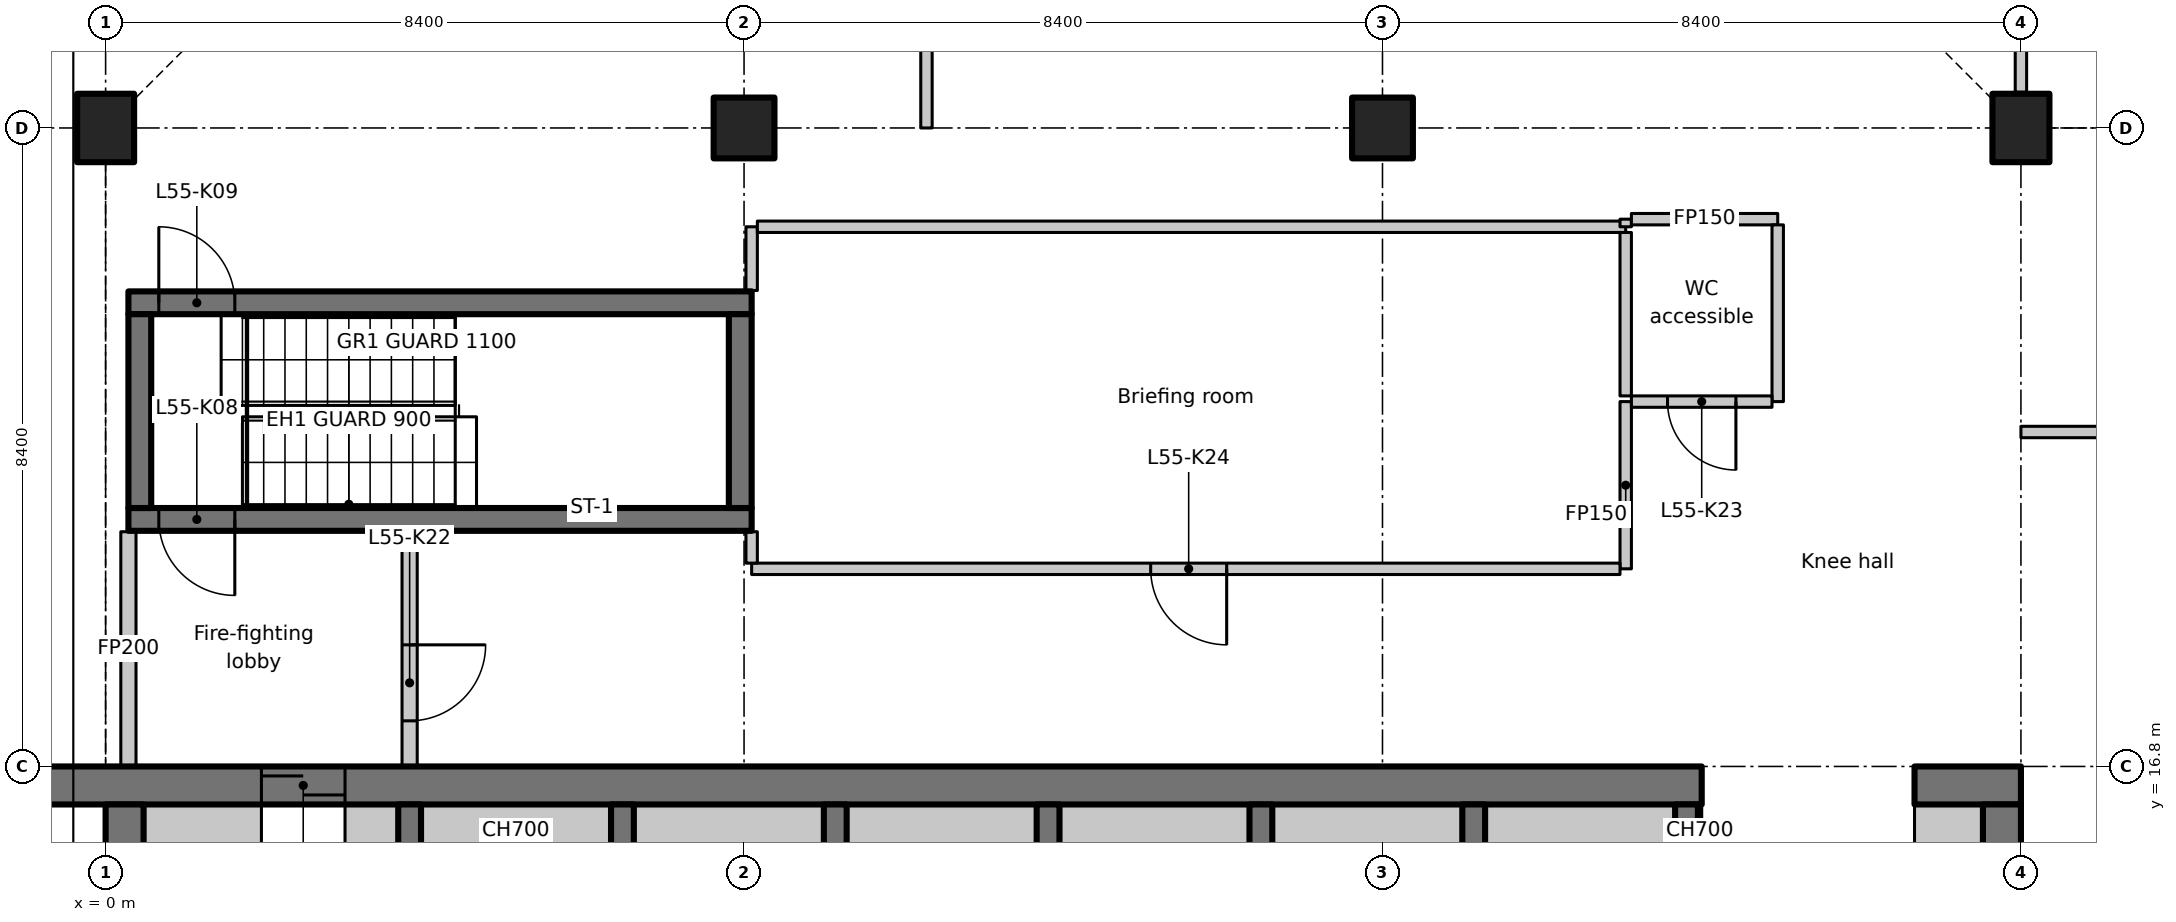
"""IFC4 building model, lengths in metres.
Left out: names, types, materials, properties, quantities, classifications, styles, units other than length and angle.
Written with IfcOpenShell. Run it as: python <this file> out.ifc"""

import sys

from ifc_helpers import new_model, si_unit, direction, frame, frame_2d, origin, origin_2d, place, context, subcontext, project, spatial, polyline, rectangle, outline, extrude, element, fill, save


model = new_model("IFC4")
c1 = context("Model", 3, precision=1e-05, world=origin(), true_north=direction((0.0, 1.0)))
c2 = subcontext(c1, "Body", "Model", "MODEL_VIEW")
j1 = project(units=[si_unit("LENGTHUNIT", "METRE"), si_unit("PLANEANGLEUNIT", "RADIAN")], contexts=[c1])
p1 = place(None, origin())
s1 = spatial("IfcSite", under=j1, at=p1, CompositionType="ELEMENT")
p2 = place(p1, origin())
s2 = spatial("IfcBuilding", under=s1, at=p2, CompositionType="ELEMENT")
p3 = place(p2, frame((0.0, 0.0, 219.3)))
s3 = spatial("IfcBuildingStorey", under=s2, at=p3, CompositionType="ELEMENT", Elevation=219.3)
p4 = place(p3, frame((0.0, 25.2, 0.0), z_axis=(0.0, 0.0, 1.0), x_axis=(1.0, 0.0, 0.0)))
e1 = element("IfcColumn", 1, at=p4, inside=s3, PredefinedType="COLUMN", context=c2, shape_type="SweptSolid", body=[
    extrude(rectangle(XDim=0.75, YDim=0.9, at=origin_2d()), origin(), (0.0, 0.0, 1.0), 3.35),
])
for number, where, z_axis, x_axis in (
    (2, (8.4, 25.2, 0.0), (0.0, 0.0, 1.0), (1.0, 0.0, 0.0)),
    (3, (16.8, 25.2, 0.0), (0.0, 0.0, 1.0), (1.0, 0.0, 0.0)),
):
    element("IfcColumn", number, at=place(p3, frame(where, z_axis=z_axis, x_axis=x_axis)), inside=s3, PredefinedType="COLUMN", context=c2, shape_type="SweptSolid", body=[
        extrude(rectangle(XDim=0.8, YDim=0.8, at=origin_2d()), origin(), (0.0, 0.0, 1.0), 3.35),
    ])
p5 = place(p3, frame((25.2, 25.2, 0.0), z_axis=(0.0, 0.0, 1.0), x_axis=(1.0, 0.0, 0.0)))
e4 = element("IfcColumn", 4, at=p5, inside=s3, PredefinedType="COLUMN", context=c2, shape_type="SweptSolid", body=[
    extrude(rectangle(XDim=0.75, YDim=0.9, at=origin_2d()), origin(), (0.0, 0.0, 1.0), 3.35),
])
p6 = place(p3, frame((-1.1, 16.55, 0.0), z_axis=(0.0, 0.0, 1.0), x_axis=(1.0, 0.0, 0.0)))
e5 = element("IfcWall", 5, at=p6, inside=s3, PredefinedType="SHEAR", context=c2, shape_type="SweptSolid", body=[
    extrude(rectangle(XDim=22.1, YDim=0.5, at=frame_2d((11.05, 0.0))), origin(), (0.0, 0.0, 1.0), 3.35),
])
p7 = place(p6, frame((3.15, 0.0, 0.0)))
e6 = element("IfcOpeningElement", 6, at=p7, cuts=e5, PredefinedType="OPENING", context=c2, shape_type="SweptSolid", body=[
    extrude(rectangle(XDim=1.1, YDim=2.3, at=frame_2d((0.55, 1.15))), frame((0.0, 0.26, 0.0), z_axis=(0.0, -1.0, 0.0), x_axis=(1.0, 0.0, 0.0)), (0.0, 0.0, 1.0), 0.52),
])
p8 = place(p3, frame((23.8, 16.55, 0.0), z_axis=(0.0, 0.0, 1.0), x_axis=(1.0, 0.0, 0.0)))
e7 = element("IfcWall", 7, at=p8, inside=s3, PredefinedType="SHEAR", context=c2, shape_type="SweptSolid", body=[
    extrude(rectangle(XDim=1.4, YDim=0.5, at=frame_2d((0.7, 0.0))), origin(), (0.0, 0.0, 1.0), 3.35),
])
p9 = place(p3, frame((0.25, 7.436, 0.0), z_axis=(0.0, 0.0, 1.0), x_axis=(0.0, 1.0, 0.0)))
e8 = element("IfcWall", 8, at=p9, inside=s3, PredefinedType="SHEAR", context=c2, shape_type="SweptSolid", body=[
    extrude(rectangle(XDim=8.864, YDim=0.5, at=frame_2d((4.432, 0.0))), origin(), (0.0, 0.0, 1.0), 3.35),
])
p10 = place(p3, frame((24.95, 12.6, 0.0), z_axis=(0.0, 0.0, 1.0), x_axis=(0.0, 1.0, 0.0)))
e9 = element("IfcWall", 9, at=p10, inside=s3, PredefinedType="SHEAR", context=c2, shape_type="SweptSolid", body=[
    extrude(rectangle(XDim=3.7, YDim=0.5, at=frame_2d((1.85, 0.0))), origin(), (0.0, 0.0, 1.0), 3.35),
])
p11 = place(p3, frame((0.5, 15.95, 0.0), z_axis=(0.0, 0.0, 1.0), x_axis=(1.0, 0.0, 0.0)))
e10 = element("IfcWall", 10, at=p11, inside=s3, PredefinedType="PARTITIONING", context=c2, shape_type="SweptSolid", body=[
    extrude(rectangle(XDim=1.55, YDim=0.7, at=frame_2d((0.775, 0.0))), origin(), (0.0, 0.0, 1.0), 3.35),
])
p12 = place(p3, frame((23.8, 15.95, 0.0), z_axis=(0.0, 0.0, 1.0), x_axis=(1.0, 0.0, 0.0)))
e11 = element("IfcWall", 11, at=p12, inside=s3, PredefinedType="PARTITIONING", context=c2, shape_type="SweptSolid", body=[
    extrude(rectangle(XDim=0.9, YDim=0.7, at=frame_2d((0.45, 0.0))), origin(), (0.0, 0.0, 1.0), 3.35),
])
for number, where, z_axis, x_axis in (
    (12, (4.0, 12.95, 0.0), (0.0, 0.0, 1.0), (0.0, 1.0, 0.0)),
    (13, (6.8, 12.95, 0.0), (0.0, 0.0, 1.0), (0.0, 1.0, 0.0)),
    (14, (9.6, 12.95, 0.0), (0.0, 0.0, 1.0), (0.0, 1.0, 0.0)),
    (15, (12.4, 12.95, 0.0), (0.0, 0.0, 1.0), (0.0, 1.0, 0.0)),
    (16, (15.2, 12.95, 0.0), (0.0, 0.0, 1.0), (0.0, 1.0, 0.0)),
    (17, (18.0, 12.95, 0.0), (0.0, 0.0, 1.0), (0.0, 1.0, 0.0)),
    (18, (20.8, 12.95, 0.0), (0.0, 0.0, 1.0), (0.0, 1.0, 0.0)),
):
    element("IfcWall", number, at=place(p3, frame(where, z_axis=z_axis, x_axis=x_axis)), inside=s3, PredefinedType="SHEAR", context=c2, shape_type="SweptSolid", body=[
        extrude(rectangle(XDim=3.35, YDim=0.3, at=frame_2d((1.675, 0.0))), origin(), (0.0, 0.0, 1.0), 3.35),
    ])
p13 = place(p3, frame((8.5, 20.05, 0.0), z_axis=(0.0, 0.0, 1.0), x_axis=(-1.0, 0.0, 0.0)))
e19 = element("IfcWall", 19, at=p13, inside=s3, PredefinedType="SHEAR", context=c2, shape_type="SweptSolid", body=[
    extrude(rectangle(XDim=8.2, YDim=0.3, at=frame_2d((4.1, 0.0))), origin(), (0.0, 0.0, 1.0), 3.35),
])
p14 = place(p13, frame((6.8, 0.0, 0.0)))
e20 = element("IfcOpeningElement", 20, at=p14, cuts=e19, PredefinedType="OPENING", context=c2, shape_type="SweptSolid", body=[
    extrude(rectangle(XDim=1.0, YDim=2.1, at=frame_2d((0.5, 1.05))), frame((0.0, 0.16, 0.0), z_axis=(0.0, -1.0, 0.0), x_axis=(1.0, 0.0, 0.0)), (0.0, 0.0, 1.0), 0.32),
])
p15 = place(p3, frame((0.3, 22.9, 0.0), z_axis=(0.0, 0.0, 1.0), x_axis=(1.0, 0.0, 0.0)))
e21 = element("IfcWall", 21, at=p15, inside=s3, PredefinedType="SHEAR", context=c2, shape_type="SweptSolid", body=[
    extrude(rectangle(XDim=8.2, YDim=0.3, at=frame_2d((4.1, 0.0))), origin(), (0.0, 0.0, 1.0), 3.35),
])
p16 = place(p15, frame((0.4, 0.0, 0.0)))
e22 = element("IfcOpeningElement", 22, at=p16, cuts=e21, PredefinedType="OPENING", context=c2, shape_type="SweptSolid", body=[
    extrude(rectangle(XDim=1.0, YDim=2.1, at=frame_2d((0.5, 1.05))), frame((0.0, 0.16, 0.0), z_axis=(0.0, -1.0, 0.0), x_axis=(1.0, 0.0, 0.0)), (0.0, 0.0, 1.0), 0.32),
])
for number, where, z_axis, x_axis in (
    (23, (0.45, 20.2, 0.0), (0.0, 0.0, 1.0), (0.0, 1.0, 0.0)),
    (24, (8.35, 20.2, 0.0), (0.0, 0.0, 1.0), (0.0, 1.0, 0.0)),
):
    element("IfcWall", number, at=place(p3, frame(where, z_axis=z_axis, x_axis=x_axis)), inside=s3, PredefinedType="SHEAR", context=c2, shape_type="SweptSolid", body=[
        extrude(rectangle(XDim=2.55, YDim=0.3, at=frame_2d((1.275, 0.0))), origin(), (0.0, 0.0, 1.0), 3.35),
    ])
p17 = place(p3, frame((0.3, 16.812, 0.0), z_axis=(0.0, 0.0, 1.0), x_axis=(0.0, 1.0, 0.0)))
e25 = element("IfcWall", 25, at=p17, inside=s3, PredefinedType="PARTITIONING", context=c2, shape_type="SweptSolid", body=[
    extrude(rectangle(XDim=3.076, YDim=0.2, at=frame_2d((1.538, 0.0))), origin(), (0.0, 0.0, 1.0), 2.98),
])
p18 = place(p3, frame((4.0, 19.888, 0.0), z_axis=(0.0, 0.0, 1.0), x_axis=(0.0, -1.0, 0.0)))
e26 = element("IfcWall", 26, at=p18, inside=s3, PredefinedType="PARTITIONING", context=c2, shape_type="SweptSolid", body=[
    extrude(rectangle(XDim=3.076, YDim=0.2, at=frame_2d((1.538, 0.0))), origin(), (0.0, 0.0, 1.0), 3.35),
])
p19 = place(p18, frame((1.488, 0.0, 0.0)))
e27 = element("IfcOpeningElement", 27, at=p19, cuts=e26, PredefinedType="OPENING", context=c2, shape_type="SweptSolid", body=[
    extrude(rectangle(XDim=1.0, YDim=2.1, at=frame_2d((0.5, 1.05))), frame((0.0, 0.11, 0.0), z_axis=(0.0, -1.0, 0.0), x_axis=(1.0, 0.0, 0.0)), (0.0, 0.0, 1.0), 0.22),
])
p20 = place(p3, frame((20.0, 21.6, 0.0), z_axis=(0.0, 0.0, 1.0), x_axis=(0.0, -1.0, 0.0)))
e28 = element("IfcWall", 28, at=p20, inside=s3, PredefinedType="PARTITIONING", context=c2, shape_type="SweptSolid", body=[
    extrude(rectangle(XDim=2.2, YDim=0.15, at=frame_2d((1.1, 0.0))), origin(), (0.0, 0.0, 1.0), 3.35),
])
p21 = place(p3, frame((19.925, 19.4, 0.0), z_axis=(0.0, 0.0, 1.0), x_axis=(-1.0, 0.0, 0.0)))
e29 = element("IfcWall", 29, at=p21, inside=s3, PredefinedType="PARTITIONING", context=c2, shape_type="SweptSolid", body=[
    extrude(rectangle(XDim=11.425, YDim=0.15, at=frame_2d((5.712, 0.0))), origin(), (0.0, 0.0, 1.0), 3.35),
])
p22 = place(p21, frame((5.175, 0.0, 0.0)))
e30 = element("IfcOpeningElement", 30, at=p22, cuts=e29, PredefinedType="OPENING", context=c2, shape_type="SweptSolid", body=[
    extrude(rectangle(XDim=1.0, YDim=2.1, at=frame_2d((0.5, 1.05))), frame((0.0, 0.085, 0.0), z_axis=(0.0, -1.0, 0.0), x_axis=(1.0, 0.0, 0.0)), (0.0, 0.0, 1.0), 0.17),
])
p23 = place(p3, frame((8.5, 19.475, 0.0), z_axis=(0.0, 0.0, 1.0), x_axis=(0.0, 1.0, 0.0)))
e31 = element("IfcWall", 31, at=p23, inside=s3, PredefinedType="PARTITIONING", context=c2, shape_type="SweptSolid", body=[
    extrude(rectangle(XDim=0.413, YDim=0.15, at=frame_2d((0.207, 0.0))), origin(), (0.0, 0.0, 1.0), 3.35),
])
p24 = place(p3, frame((8.5, 23.062, 0.0), z_axis=(0.0, 0.0, 1.0), x_axis=(0.0, 1.0, 0.0)))
e32 = element("IfcWall", 32, at=p24, inside=s3, PredefinedType="PARTITIONING", context=c2, shape_type="SweptSolid", body=[
    extrude(rectangle(XDim=0.838, YDim=0.15, at=frame_2d((0.419, 0.0))), origin(), (0.0, 0.0, 1.0), 3.35),
])
p25 = place(p3, frame((8.575, 23.9, 0.0), z_axis=(0.0, 0.0, 1.0), x_axis=(1.0, 0.0, 0.0)))
e33 = element("IfcWall", 33, at=p25, inside=s3, PredefinedType="PARTITIONING", context=c2, shape_type="SweptSolid", body=[
    extrude(rectangle(XDim=11.425, YDim=0.15, at=frame_2d((5.712, 0.0))), origin(), (0.0, 0.0, 1.0), 3.35),
])
p26 = place(p3, frame((20.0, 23.9, 0.0), z_axis=(0.0, 0.0, 1.0), x_axis=(0.0, 1.0, 0.0)))
e34 = element("IfcWall", 34, at=p26, inside=s3, PredefinedType="PARTITIONING", context=c2, shape_type="SweptSolid", body=[
    extrude(rectangle(XDim=0.1, YDim=0.15, at=frame_2d((0.05, 0.0))), origin(), (0.0, 0.0, 1.0), 3.35),
])
p27 = place(p3, frame((20.075, 24.0, 0.0), z_axis=(0.0, 0.0, 1.0), x_axis=(1.0, 0.0, 0.0)))
e35 = element("IfcWall", 35, at=p27, inside=s3, PredefinedType="PARTITIONING", context=c2, shape_type="SweptSolid", body=[
    extrude(rectangle(XDim=1.925, YDim=0.15, at=frame_2d((0.962, 0.0))), origin(), (0.0, 0.0, 1.0), 3.35),
])
p28 = place(p3, frame((22.0, 23.925, 0.0), z_axis=(0.0, 0.0, 1.0), x_axis=(0.0, -1.0, 0.0)))
e36 = element("IfcWall", 36, at=p28, inside=s3, PredefinedType="PARTITIONING", context=c2, shape_type="SweptSolid", body=[
    extrude(rectangle(XDim=2.325, YDim=0.15, at=frame_2d((1.163, 0.0))), origin(), (0.0, 0.0, 1.0), 3.35),
])
p29 = place(p3, frame((21.925, 21.6, 0.0), z_axis=(0.0, 0.0, 1.0), x_axis=(-1.0, 0.0, 0.0)))
e37 = element("IfcWall", 37, at=p29, inside=s3, PredefinedType="PARTITIONING", context=c2, shape_type="SweptSolid", body=[
    extrude(rectangle(XDim=1.85, YDim=0.15, at=frame_2d((0.925, 0.0))), origin(), (0.0, 0.0, 1.0), 3.35),
])
p30 = place(p29, frame((0.475, 0.0, 0.0)))
e38 = element("IfcOpeningElement", 38, at=p30, cuts=e37, PredefinedType="OPENING", context=c2, shape_type="SweptSolid", body=[
    extrude(rectangle(XDim=0.9, YDim=2.1, at=frame_2d((0.45, 1.05))), frame((0.0, 0.085, 0.0), z_axis=(0.0, -1.0, 0.0), x_axis=(1.0, 0.0, 0.0)), (0.0, 0.0, 1.0), 0.17),
])
p31 = place(p3, frame((20.0, 21.675, 0.0), z_axis=(0.0, 0.0, 1.0), x_axis=(0.0, 1.0, 0.0)))
e39 = element("IfcWall", 39, at=p31, inside=s3, PredefinedType="PARTITIONING", context=c2, shape_type="SweptSolid", body=[
    extrude(rectangle(XDim=2.15, YDim=0.15, at=frame_2d((1.075, 0.0))), origin(), (0.0, 0.0, 1.0), 3.35),
])
p32 = place(p3, frame((3.15, 15.95, 0.0), z_axis=(0.0, 0.0, 1.0), x_axis=(1.0, 0.0, 0.0)))
e40 = element("IfcWall", 40, at=p32, inside=s3, PredefinedType="PARTITIONING", context=c2, shape_type="SweptSolid", body=[
    extrude(rectangle(XDim=0.7, YDim=0.7, at=frame_2d((0.35, 0.0))), origin(), (0.0, 0.0, 1.0), 3.35),
])
for number, where, z_axis, x_axis in (
    (41, (4.15, 15.95, 0.0), (0.0, 0.0, 1.0), (1.0, 0.0, 0.0)),
    (42, (6.95, 15.95, 0.0), (0.0, 0.0, 1.0), (1.0, 0.0, 0.0)),
    (43, (9.75, 15.95, 0.0), (0.0, 0.0, 1.0), (1.0, 0.0, 0.0)),
    (44, (12.55, 15.95, 0.0), (0.0, 0.0, 1.0), (1.0, 0.0, 0.0)),
    (45, (15.35, 15.95, 0.0), (0.0, 0.0, 1.0), (1.0, 0.0, 0.0)),
    (46, (18.15, 15.95, 0.0), (0.0, 0.0, 1.0), (1.0, 0.0, 0.0)),
):
    element("IfcWall", number, at=place(p3, frame(where, z_axis=z_axis, x_axis=x_axis)), inside=s3, PredefinedType="PARTITIONING", context=c2, shape_type="SweptSolid", body=[
        extrude(rectangle(XDim=2.5, YDim=0.7, at=frame_2d((1.25, 0.0))), origin(), (0.0, 0.0, 1.0), 3.35),
    ])
p33 = place(p3, frame((20.95, 15.95, 0.0), z_axis=(0.0, 0.0, 1.0), x_axis=(1.0, 0.0, 0.0)))
e47 = element("IfcWall", 47, at=p33, inside=s3, PredefinedType="PARTITIONING", context=c2, shape_type="SweptSolid", body=[
    extrude(rectangle(XDim=0.05, YDim=0.7, at=frame_2d((0.025, 0.0))), origin(), (0.0, 0.0, 1.0), 3.35),
])
p34 = place(p3, frame((25.2, 21.2, 0.0), z_axis=(0.0, 0.0, 1.0), x_axis=(1.0, 0.0, 0.0)))
e48 = element("IfcWall", 48, at=p34, inside=s3, PredefinedType="PARTITIONING", context=c2, shape_type="SweptSolid", body=[
    extrude(rectangle(XDim=4.2, YDim=0.15, at=frame_2d((2.1, 0.0))), origin(), (0.0, 0.0, 1.0), 3.33),
])
p35 = place(p34, frame((1.5, 0.0, 0.0)))
e49 = element("IfcOpeningElement", 49, at=p35, cuts=e48, PredefinedType="OPENING", context=c2, shape_type="SweptSolid", body=[
    extrude(rectangle(XDim=1.0, YDim=2.1, at=frame_2d((0.5, 1.05))), frame((0.0, 0.085, 0.0), z_axis=(0.0, -1.0, 0.0), x_axis=(1.0, 0.0, 0.0)), (0.0, 0.0, 1.0), 0.17),
])
p36 = place(p3, frame((25.2, 25.67, 0.0), z_axis=(0.0, 0.0, 1.0), x_axis=(0.0, 1.0, 0.0)))
e50 = element("IfcWall", 50, at=p36, inside=s3, PredefinedType="PARTITIONING", context=c2, shape_type="SweptSolid", body=[
    extrude(rectangle(XDim=4.487, YDim=0.15, at=frame_2d((2.243, 0.0))), origin(), (0.0, 0.0, 1.0), 2.98),
])
p37 = place(p3, frame((10.8, 25.2, 0.0), z_axis=(0.0, 0.0, 1.0), x_axis=(0.0, 1.0, 0.0)))
e51 = element("IfcWall", 51, at=p37, inside=s3, PredefinedType="PARTITIONING", context=c2, shape_type="SweptSolid", body=[
    extrude(outline(polyline([(0.0, 0.0), (8.4, 0.0), (8.4, 2.98), (7.952, 2.98), (7.95, 3.33), (0.0, 3.33), (0.0, 0.0)])), frame((0.0, 0.075, 0.0), z_axis=(0.0, -1.0, 0.0), x_axis=(1.0, 0.0, 0.0)), (0.0, 0.0, 1.0), 0.15),
])
p38 = place(p37, frame((3.3, 0.0, 0.0)))
e52 = element("IfcOpeningElement", 52, at=p38, cuts=e51, PredefinedType="OPENING", context=c2, shape_type="SweptSolid", body=[
    extrude(rectangle(XDim=1.6, YDim=2.1, at=frame_2d((0.8, 1.05))), frame((0.0, 0.085, 0.0), z_axis=(0.0, -1.0, 0.0), x_axis=(1.0, 0.0, 0.0)), (0.0, 0.0, 1.0), 0.17),
])
p39 = place(p7, origin())
e53 = element("IfcDoor", 53, at=p39, inside=s3, OperationType="SLIDING_TO_LEFT", PredefinedType="DOOR", context=c2, shape_type="SweptSolid", body=[
    extrude(rectangle(XDim=1.1, YDim=2.3, at=frame_2d((0.55, 1.15))), frame((0.0, 0.025, 0.0), z_axis=(0.0, -1.0, 0.0), x_axis=(1.0, 0.0, 0.0)), (0.0, 0.0, 1.0), 0.05),
])
fill(e6, e53)
p40 = place(p14, origin())
e54 = element("IfcDoor", 54, at=p40, inside=s3, OperationType="SINGLE_SWING_RIGHT", PredefinedType="DOOR", context=c2, shape_type="SweptSolid", body=[
    extrude(rectangle(XDim=1.0, YDim=2.1, at=frame_2d((0.5, 1.05))), frame((0.0, 0.025, 0.0), z_axis=(0.0, -1.0, 0.0), x_axis=(1.0, 0.0, 0.0)), (0.0, 0.0, 1.0), 0.05),
])
fill(e20, e54)
p41 = place(p16, origin())
e55 = element("IfcDoor", 55, at=p41, inside=s3, OperationType="SINGLE_SWING_LEFT", PredefinedType="DOOR", context=c2, shape_type="SweptSolid", body=[
    extrude(rectangle(XDim=1.0, YDim=2.1, at=frame_2d((0.5, 1.05))), frame((0.0, 0.025, 0.0), z_axis=(0.0, -1.0, 0.0), x_axis=(1.0, 0.0, 0.0)), (0.0, 0.0, 1.0), 0.05),
])
fill(e22, e55)
p42 = place(p19, origin())
e56 = element("IfcDoor", 56, at=p42, inside=s3, OperationType="SINGLE_SWING_RIGHT", PredefinedType="DOOR", context=c2, shape_type="SweptSolid", body=[
    extrude(rectangle(XDim=1.0, YDim=2.1, at=frame_2d((0.5, 1.05))), frame((0.0, 0.025, 0.0), z_axis=(0.0, -1.0, 0.0), x_axis=(1.0, 0.0, 0.0)), (0.0, 0.0, 1.0), 0.05),
])
fill(e27, e56)
p43 = place(p30, origin())
e57 = element("IfcDoor", 57, at=p43, inside=s3, OperationType="SINGLE_SWING_LEFT", PredefinedType="DOOR", context=c2, shape_type="SweptSolid", body=[
    extrude(rectangle(XDim=0.9, YDim=2.1, at=frame_2d((0.45, 1.05))), frame((0.0, 0.025, 0.0), z_axis=(0.0, -1.0, 0.0), x_axis=(1.0, 0.0, 0.0)), (0.0, 0.0, 1.0), 0.05),
])
fill(e38, e57)
p44 = place(p22, origin())
e58 = element("IfcDoor", 58, at=p44, inside=s3, OperationType="SINGLE_SWING_RIGHT", PredefinedType="DOOR", context=c2, shape_type="SweptSolid", body=[
    extrude(rectangle(XDim=1.0, YDim=2.1, at=frame_2d((0.5, 1.05))), frame((0.0, 0.025, 0.0), z_axis=(0.0, -1.0, 0.0), x_axis=(1.0, 0.0, 0.0)), (0.0, 0.0, 1.0), 0.05),
])
fill(e30, e58)
save(model, sys.argv[1])
